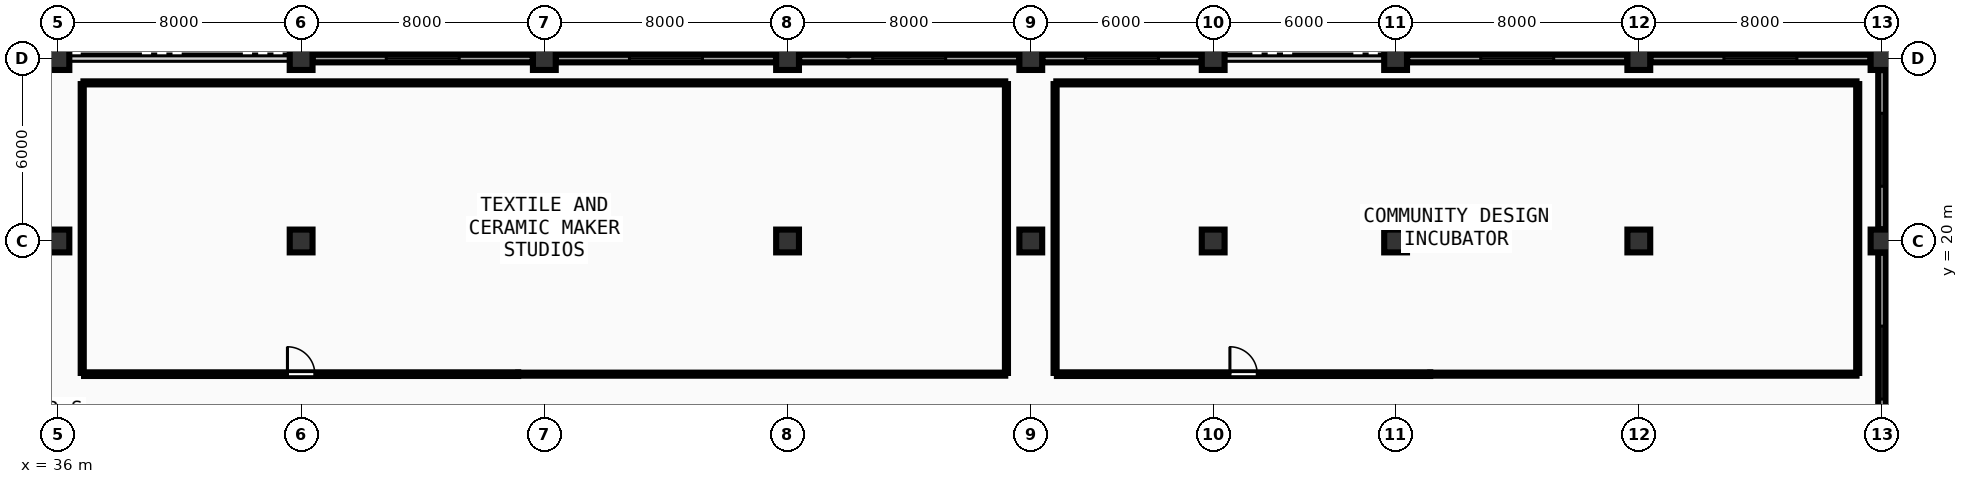
"""IFC4 building model, lengths in metres.
Left out: names, types, materials, properties, quantities, classifications, styles, units other than length and angle.
Written with IfcOpenShell. Run it as: python <this file> out.ifc"""

import sys

from ifc_helpers import new_model, si_unit, direction, frame, frame_2d, origin, origin_2d, place, context, subcontext, project, spatial, rectangle, extrude, element, fill, save


model = new_model("IFC4")
c1 = context("Model", 3, precision=1e-05, world=origin(), true_north=direction((0.0, 1.0)))
c2 = subcontext(c1, "Body", "Model", "MODEL_VIEW")
j1 = project(units=[si_unit("LENGTHUNIT", "METRE"), si_unit("PLANEANGLEUNIT", "RADIAN")], contexts=[c1])
p1 = place(None, origin())
s1 = spatial("IfcSite", under=j1, at=p1, CompositionType="ELEMENT")
p2 = place(p1, origin())
s2 = spatial("IfcBuilding", under=s1, at=p2, CompositionType="ELEMENT")
p3 = place(p2, frame((0.0, 0.0, 9.0)))
s3 = spatial("IfcBuildingStorey", under=s2, at=p3, CompositionType="ELEMENT", Elevation=9.0)
for number, where, z_axis, x_axis in (
    (1, (36.0, 20.0, 0.0), (0.0, 0.0, 1.0), (1.0, 0.0, 0.0)),
    (2, (36.0, 26.0, 0.0), (0.0, 0.0, 1.0), (1.0, 0.0, 0.0)),
    (3, (44.0, 20.0, 0.0), (0.0, 0.0, 1.0), (1.0, 0.0, 0.0)),
    (4, (44.0, 26.0, 0.0), (0.0, 0.0, 1.0), (1.0, 0.0, 0.0)),
    (5, (52.0, 20.0, 0.0), (0.0, 0.0, 1.0), (1.0, 0.0, 0.0)),
    (6, (52.0, 26.0, 0.0), (0.0, 0.0, 1.0), (1.0, 0.0, 0.0)),
    (7, (60.0, 20.0, 0.0), (0.0, 0.0, 1.0), (1.0, 0.0, 0.0)),
    (8, (60.0, 26.0, 0.0), (0.0, 0.0, 1.0), (1.0, 0.0, 0.0)),
    (9, (68.0, 20.0, 0.0), (0.0, 0.0, 1.0), (1.0, 0.0, 0.0)),
    (10, (68.0, 26.0, 0.0), (0.0, 0.0, 1.0), (1.0, 0.0, 0.0)),
    (11, (74.0, 20.0, 0.0), (0.0, 0.0, 1.0), (1.0, 0.0, 0.0)),
    (12, (74.0, 26.0, 0.0), (0.0, 0.0, 1.0), (1.0, 0.0, 0.0)),
    (13, (80.0, 20.0, 0.0), (0.0, 0.0, 1.0), (1.0, 0.0, 0.0)),
    (14, (80.0, 26.0, 0.0), (0.0, 0.0, 1.0), (1.0, 0.0, 0.0)),
    (15, (88.0, 20.0, 0.0), (0.0, 0.0, 1.0), (1.0, 0.0, 0.0)),
    (16, (88.0, 26.0, 0.0), (0.0, 0.0, 1.0), (1.0, 0.0, 0.0)),
    (17, (96.0, 20.0, 0.0), (0.0, 0.0, 1.0), (1.0, 0.0, 0.0)),
    (18, (96.0, 26.0, 0.0), (0.0, 0.0, 1.0), (1.0, 0.0, 0.0)),
):
    element("IfcColumn", number, at=place(p3, frame(where, z_axis=z_axis, x_axis=x_axis)), inside=s3, PredefinedType="COLUMN", context=c2, shape_type="SweptSolid", body=[
        extrude(rectangle(XDim=0.75, YDim=0.75, at=origin_2d()), origin(), (0.0, 0.0, 1.0), 4.5),
    ])
p4 = place(p3, frame((96.0, 12.38, 0.0), z_axis=(0.0, 0.0, 1.0), x_axis=(0.0, 1.0, 0.0)))
e19 = element("IfcWall", 19, at=p4, inside=s3, PredefinedType="SOLIDWALL", context=c2, shape_type="SweptSolid", body=[
    extrude(rectangle(XDim=7.24, YDim=0.25, at=frame_2d((3.62, 0.0))), origin(), (0.0, 0.0, 1.0), 3.42),
])
p5 = place(p4, frame((2.42, 0.0, 0.95)))
e20 = element("IfcOpeningElement", 20, at=p5, cuts=e19, PredefinedType="OPENING", context=c2, shape_type="SweptSolid", body=[
    extrude(rectangle(XDim=2.4, YDim=1.65, at=frame_2d((1.2, 0.825))), frame((0.0, 0.135, 0.0), z_axis=(0.0, -1.0, 0.0), x_axis=(1.0, 0.0, 0.0)), (0.0, 0.0, 1.0), 0.27),
])
p6 = place(p3, frame((96.0, 20.38, 0.0), z_axis=(0.0, 0.0, 1.0), x_axis=(0.0, 1.0, 0.0)))
e21 = element("IfcWall", 21, at=p6, inside=s3, PredefinedType="SOLIDWALL", context=c2, shape_type="SweptSolid", body=[
    extrude(rectangle(XDim=5.24, YDim=0.25, at=frame_2d((2.62, 0.0))), origin(), (0.0, 0.0, 1.0), 3.42),
])
p7 = place(p6, frame((1.42, 0.0, 0.95)))
e22 = element("IfcOpeningElement", 22, at=p7, cuts=e21, PredefinedType="OPENING", context=c2, shape_type="SweptSolid", body=[
    extrude(rectangle(XDim=2.4, YDim=1.65, at=frame_2d((1.2, 0.825))), frame((0.0, 0.135, 0.0), z_axis=(0.0, -1.0, 0.0), x_axis=(1.0, 0.0, 0.0)), (0.0, 0.0, 1.0), 0.27),
])
p8 = place(p3, frame((95.62, 26.0, 0.0), z_axis=(0.0, 0.0, 1.0), x_axis=(-1.0, 0.0, 0.0)))
e23 = element("IfcWall", 23, at=p8, inside=s3, PredefinedType="SOLIDWALL", context=c2, shape_type="SweptSolid", body=[
    extrude(rectangle(XDim=7.24, YDim=0.25, at=frame_2d((3.62, 0.0))), origin(), (0.0, 0.0, 1.0), 3.42),
])
p9 = place(p8, frame((2.42, 0.0, 0.95)))
e24 = element("IfcOpeningElement", 24, at=p9, cuts=e23, PredefinedType="OPENING", context=c2, shape_type="SweptSolid", body=[
    extrude(rectangle(XDim=2.4, YDim=1.65, at=frame_2d((1.2, 0.825))), frame((0.0, 0.135, 0.0), z_axis=(0.0, -1.0, 0.0), x_axis=(1.0, 0.0, 0.0)), (0.0, 0.0, 1.0), 0.27),
])
p10 = place(p3, frame((87.62, 26.0, 0.0), z_axis=(0.0, 0.0, 1.0), x_axis=(-1.0, 0.0, 0.0)))
e25 = element("IfcWall", 25, at=p10, inside=s3, PredefinedType="SOLIDWALL", context=c2, shape_type="SweptSolid", body=[
    extrude(rectangle(XDim=7.24, YDim=0.25, at=frame_2d((3.62, 0.0))), origin(), (0.0, 0.0, 1.0), 3.42),
])
p11 = place(p10, frame((2.42, 0.0, 0.95)))
e26 = element("IfcOpeningElement", 26, at=p11, cuts=e25, PredefinedType="OPENING", context=c2, shape_type="SweptSolid", body=[
    extrude(rectangle(XDim=2.4, YDim=1.65, at=frame_2d((1.2, 0.825))), frame((0.0, 0.135, 0.0), z_axis=(0.0, -1.0, 0.0), x_axis=(1.0, 0.0, 0.0)), (0.0, 0.0, 1.0), 0.27),
])
p12 = place(p3, frame((73.62, 26.0, 0.0), z_axis=(0.0, 0.0, 1.0), x_axis=(-1.0, 0.0, 0.0)))
e27 = element("IfcWall", 27, at=p12, inside=s3, PredefinedType="SOLIDWALL", context=c2, shape_type="SweptSolid", body=[
    extrude(rectangle(XDim=5.24, YDim=0.25, at=frame_2d((2.62, 0.0))), origin(), (0.0, 0.0, 1.0), 3.42),
])
p13 = place(p12, frame((1.42, 0.0, 0.95)))
e28 = element("IfcOpeningElement", 28, at=p13, cuts=e27, PredefinedType="OPENING", context=c2, shape_type="SweptSolid", body=[
    extrude(rectangle(XDim=2.4, YDim=1.65, at=frame_2d((1.2, 0.825))), frame((0.0, 0.135, 0.0), z_axis=(0.0, -1.0, 0.0), x_axis=(1.0, 0.0, 0.0)), (0.0, 0.0, 1.0), 0.27),
])
p14 = place(p3, frame((67.62, 26.0, 0.0), z_axis=(0.0, 0.0, 1.0), x_axis=(-1.0, 0.0, 0.0)))
e29 = element("IfcWall", 29, at=p14, inside=s3, PredefinedType="SOLIDWALL", context=c2, shape_type="SweptSolid", body=[
    extrude(rectangle(XDim=7.24, YDim=0.25, at=frame_2d((3.62, 0.0))), origin(), (0.0, 0.0, 1.0), 3.42),
])
p15 = place(p14, frame((2.42, 0.0, 0.95)))
e30 = element("IfcOpeningElement", 30, at=p15, cuts=e29, PredefinedType="OPENING", context=c2, shape_type="SweptSolid", body=[
    extrude(rectangle(XDim=2.4, YDim=1.65, at=frame_2d((1.2, 0.825))), frame((0.0, 0.135, 0.0), z_axis=(0.0, -1.0, 0.0), x_axis=(1.0, 0.0, 0.0)), (0.0, 0.0, 1.0), 0.27),
])
p16 = place(p3, frame((59.62, 26.0, 0.0), z_axis=(0.0, 0.0, 1.0), x_axis=(-1.0, 0.0, 0.0)))
e31 = element("IfcWall", 31, at=p16, inside=s3, PredefinedType="SOLIDWALL", context=c2, shape_type="SweptSolid", body=[
    extrude(rectangle(XDim=7.24, YDim=0.25, at=frame_2d((3.62, 0.0))), origin(), (0.0, 0.0, 1.0), 3.42),
])
p17 = place(p16, frame((2.42, 0.0, 0.95)))
e32 = element("IfcOpeningElement", 32, at=p17, cuts=e31, PredefinedType="OPENING", context=c2, shape_type="SweptSolid", body=[
    extrude(rectangle(XDim=2.4, YDim=1.65, at=frame_2d((1.2, 0.825))), frame((0.0, 0.135, 0.0), z_axis=(0.0, -1.0, 0.0), x_axis=(1.0, 0.0, 0.0)), (0.0, 0.0, 1.0), 0.27),
])
p18 = place(p3, frame((51.62, 26.0, 0.0), z_axis=(0.0, 0.0, 1.0), x_axis=(-1.0, 0.0, 0.0)))
e33 = element("IfcWall", 33, at=p18, inside=s3, PredefinedType="SOLIDWALL", context=c2, shape_type="SweptSolid", body=[
    extrude(rectangle(XDim=7.24, YDim=0.25, at=frame_2d((3.62, 0.0))), origin(), (0.0, 0.0, 1.0), 3.42),
])
p19 = place(p18, frame((2.42, 0.0, 0.95)))
e34 = element("IfcOpeningElement", 34, at=p19, cuts=e33, PredefinedType="OPENING", context=c2, shape_type="SweptSolid", body=[
    extrude(rectangle(XDim=2.4, YDim=1.65, at=frame_2d((1.2, 0.825))), frame((0.0, 0.135, 0.0), z_axis=(0.0, -1.0, 0.0), x_axis=(1.0, 0.0, 0.0)), (0.0, 0.0, 1.0), 0.27),
])
p20 = place(p3, frame((36.86, 15.62, 0.0), z_axis=(0.0, 0.0, 1.0), x_axis=(1.0, 0.0, 0.0)))
e35 = element("IfcWall", 35, at=p20, inside=s3, PredefinedType="PARTITIONING", context=c2, shape_type="SweptSolid", body=[
    extrude(rectangle(XDim=14.28, YDim=0.12, at=frame_2d((7.14, 0.0))), origin(), (0.0, 0.0, 1.0), 3.425),
])
p21 = place(p20, frame((6.69, 0.0, 0.0)))
e36 = element("IfcOpeningElement", 36, at=p21, cuts=e35, PredefinedType="OPENING", context=c2, shape_type="SweptSolid", body=[
    extrude(rectangle(XDim=0.9, YDim=2.08, at=frame_2d((0.45, 1.04))), frame((0.0, 0.07, 0.0), z_axis=(0.0, -1.0, 0.0), x_axis=(1.0, 0.0, 0.0)), (0.0, 0.0, 1.0), 0.14),
])
p22 = place(p3, frame((68.86, 15.62, 0.0), z_axis=(0.0, 0.0, 1.0), x_axis=(1.0, 0.0, 0.0)))
e37 = element("IfcWall", 37, at=p22, inside=s3, PredefinedType="PARTITIONING", context=c2, shape_type="SweptSolid", body=[
    extrude(rectangle(XDim=12.28, YDim=0.12, at=frame_2d((6.14, 0.0))), origin(), (0.0, 0.0, 1.0), 3.425),
])
p23 = place(p22, frame((5.69, 0.0, 0.0)))
e38 = element("IfcOpeningElement", 38, at=p23, cuts=e37, PredefinedType="OPENING", context=c2, shape_type="SweptSolid", body=[
    extrude(rectangle(XDim=0.9, YDim=2.08, at=frame_2d((0.45, 1.04))), frame((0.0, 0.07, 0.0), z_axis=(0.0, -1.0, 0.0), x_axis=(1.0, 0.0, 0.0)), (0.0, 0.0, 1.0), 0.14),
])
p24 = place(p3, frame((51.14, 15.62, 0.0), z_axis=(0.0, 0.0, 1.0), x_axis=(1.0, 0.0, 0.0)))
e39 = element("IfcWall", 39, at=p24, inside=s3, PredefinedType="PARTITIONING", context=c2, shape_type="SweptSolid", body=[
    extrude(rectangle(XDim=16.02, YDim=0.1, at=frame_2d((8.01, 0.0))), origin(), (0.0, 0.0, 1.0), 3.425),
])
p25 = place(p3, frame((67.2, 15.66, 0.0), z_axis=(0.0, 0.0, 1.0), x_axis=(0.0, 1.0, 0.0)))
e40 = element("IfcWall", 40, at=p25, inside=s3, PredefinedType="PARTITIONING", context=c2, shape_type="SweptSolid", body=[
    extrude(rectangle(XDim=9.5, YDim=0.1, at=frame_2d((4.75, 0.0))), origin(), (0.0, 0.0, 1.0), 3.425),
])
p26 = place(p3, frame((67.16, 25.2, 0.0), z_axis=(0.0, 0.0, 1.0), x_axis=(-1.0, 0.0, 0.0)))
e41 = element("IfcWall", 41, at=p26, inside=s3, PredefinedType="PARTITIONING", context=c2, shape_type="SweptSolid", body=[
    extrude(rectangle(XDim=30.32, YDim=0.1, at=frame_2d((15.16, 0.0))), origin(), (0.0, 0.0, 1.0), 3.425),
])
p27 = place(p3, frame((36.8, 25.16, 0.0), z_axis=(0.0, 0.0, 1.0), x_axis=(0.0, -1.0, 0.0)))
e42 = element("IfcWall", 42, at=p27, inside=s3, PredefinedType="PARTITIONING", context=c2, shape_type="SweptSolid", body=[
    extrude(rectangle(XDim=9.5, YDim=0.1, at=frame_2d((4.75, 0.0))), origin(), (0.0, 0.0, 1.0), 3.425),
])
p28 = place(p3, frame((81.14, 15.62, 0.0), z_axis=(0.0, 0.0, 1.0), x_axis=(1.0, 0.0, 0.0)))
e43 = element("IfcWall", 43, at=p28, inside=s3, PredefinedType="PARTITIONING", context=c2, shape_type="SweptSolid", body=[
    extrude(rectangle(XDim=14.02, YDim=0.1, at=frame_2d((7.01, 0.0))), origin(), (0.0, 0.0, 1.0), 3.425),
])
p29 = place(p3, frame((95.2, 15.66, 0.0), z_axis=(0.0, 0.0, 1.0), x_axis=(0.0, 1.0, 0.0)))
e44 = element("IfcWall", 44, at=p29, inside=s3, PredefinedType="PARTITIONING", context=c2, shape_type="SweptSolid", body=[
    extrude(rectangle(XDim=9.5, YDim=0.1, at=frame_2d((4.75, 0.0))), origin(), (0.0, 0.0, 1.0), 3.425),
])
p30 = place(p3, frame((95.16, 25.2, 0.0), z_axis=(0.0, 0.0, 1.0), x_axis=(-1.0, 0.0, 0.0)))
e45 = element("IfcWall", 45, at=p30, inside=s3, PredefinedType="PARTITIONING", context=c2, shape_type="SweptSolid", body=[
    extrude(rectangle(XDim=26.32, YDim=0.1, at=frame_2d((13.16, 0.0))), origin(), (0.0, 0.0, 1.0), 3.425),
])
p31 = place(p3, frame((68.8, 25.16, 0.0), z_axis=(0.0, 0.0, 1.0), x_axis=(0.0, -1.0, 0.0)))
e46 = element("IfcWall", 46, at=p31, inside=s3, PredefinedType="PARTITIONING", context=c2, shape_type="SweptSolid", body=[
    extrude(rectangle(XDim=9.5, YDim=0.1, at=frame_2d((4.75, 0.0))), origin(), (0.0, 0.0, 1.0), 3.425),
])
p32 = place(p5, origin())
e47 = element("IfcWindow", 47, at=p32, inside=s3, PartitioningType="SINGLE_PANEL", PredefinedType="WINDOW", context=c2, shape_type="SweptSolid", body=[
    extrude(rectangle(XDim=2.4, YDim=1.65, at=frame_2d((1.2, 0.825))), frame((0.0, 0.03, 0.0), z_axis=(0.0, -1.0, 0.0), x_axis=(1.0, 0.0, 0.0)), (0.0, 0.0, 1.0), 0.06),
])
fill(e20, e47)
p33 = place(p7, origin())
e48 = element("IfcWindow", 48, at=p33, inside=s3, PartitioningType="SINGLE_PANEL", PredefinedType="WINDOW", context=c2, shape_type="SweptSolid", body=[
    extrude(rectangle(XDim=2.4, YDim=1.65, at=frame_2d((1.2, 0.825))), frame((0.0, 0.03, 0.0), z_axis=(0.0, -1.0, 0.0), x_axis=(1.0, 0.0, 0.0)), (0.0, 0.0, 1.0), 0.06),
])
fill(e22, e48)
p34 = place(p9, origin())
e49 = element("IfcWindow", 49, at=p34, inside=s3, PartitioningType="SINGLE_PANEL", PredefinedType="WINDOW", context=c2, shape_type="SweptSolid", body=[
    extrude(rectangle(XDim=2.4, YDim=1.65, at=frame_2d((1.2, 0.825))), frame((0.0, 0.03, 0.0), z_axis=(0.0, -1.0, 0.0), x_axis=(1.0, 0.0, 0.0)), (0.0, 0.0, 1.0), 0.06),
])
fill(e24, e49)
p35 = place(p11, origin())
e50 = element("IfcWindow", 50, at=p35, inside=s3, PartitioningType="SINGLE_PANEL", PredefinedType="WINDOW", context=c2, shape_type="SweptSolid", body=[
    extrude(rectangle(XDim=2.4, YDim=1.65, at=frame_2d((1.2, 0.825))), frame((0.0, 0.03, 0.0), z_axis=(0.0, -1.0, 0.0), x_axis=(1.0, 0.0, 0.0)), (0.0, 0.0, 1.0), 0.06),
])
fill(e26, e50)
p36 = place(p13, origin())
e51 = element("IfcWindow", 51, at=p36, inside=s3, PartitioningType="SINGLE_PANEL", PredefinedType="WINDOW", context=c2, shape_type="SweptSolid", body=[
    extrude(rectangle(XDim=2.4, YDim=1.65, at=frame_2d((1.2, 0.825))), frame((0.0, 0.03, 0.0), z_axis=(0.0, -1.0, 0.0), x_axis=(1.0, 0.0, 0.0)), (0.0, 0.0, 1.0), 0.06),
])
fill(e28, e51)
p37 = place(p15, origin())
e52 = element("IfcWindow", 52, at=p37, inside=s3, PartitioningType="SINGLE_PANEL", PredefinedType="WINDOW", context=c2, shape_type="SweptSolid", body=[
    extrude(rectangle(XDim=2.4, YDim=1.65, at=frame_2d((1.2, 0.825))), frame((0.0, 0.03, 0.0), z_axis=(0.0, -1.0, 0.0), x_axis=(1.0, 0.0, 0.0)), (0.0, 0.0, 1.0), 0.06),
])
fill(e30, e52)
p38 = place(p17, origin())
e53 = element("IfcWindow", 53, at=p38, inside=s3, PartitioningType="SINGLE_PANEL", PredefinedType="WINDOW", context=c2, shape_type="SweptSolid", body=[
    extrude(rectangle(XDim=2.4, YDim=1.65, at=frame_2d((1.2, 0.825))), frame((0.0, 0.03, 0.0), z_axis=(0.0, -1.0, 0.0), x_axis=(1.0, 0.0, 0.0)), (0.0, 0.0, 1.0), 0.06),
])
fill(e32, e53)
p39 = place(p19, origin())
e54 = element("IfcWindow", 54, at=p39, inside=s3, PartitioningType="SINGLE_PANEL", PredefinedType="WINDOW", context=c2, shape_type="SweptSolid", body=[
    extrude(rectangle(XDim=2.4, YDim=1.65, at=frame_2d((1.2, 0.825))), frame((0.0, 0.03, 0.0), z_axis=(0.0, -1.0, 0.0), x_axis=(1.0, 0.0, 0.0)), (0.0, 0.0, 1.0), 0.06),
])
fill(e34, e54)
p40 = place(p21, origin())
e55 = element("IfcDoor", 55, at=p40, inside=s3, OperationType="SINGLE_SWING_LEFT", PredefinedType="DOOR", context=c2, shape_type="SweptSolid", body=[
    extrude(rectangle(XDim=0.9, YDim=2.08, at=frame_2d((0.45, 1.04))), frame((0.0, 0.025, 0.0), z_axis=(0.0, -1.0, 0.0), x_axis=(1.0, 0.0, 0.0)), (0.0, 0.0, 1.0), 0.05),
])
fill(e36, e55)
p41 = place(p23, origin())
e56 = element("IfcDoor", 56, at=p41, inside=s3, OperationType="SINGLE_SWING_LEFT", PredefinedType="DOOR", context=c2, shape_type="SweptSolid", body=[
    extrude(rectangle(XDim=0.9, YDim=2.08, at=frame_2d((0.45, 1.04))), frame((0.0, 0.025, 0.0), z_axis=(0.0, -1.0, 0.0), x_axis=(1.0, 0.0, 0.0)), (0.0, 0.0, 1.0), 0.05),
])
fill(e38, e56)
save(model, sys.argv[1])
